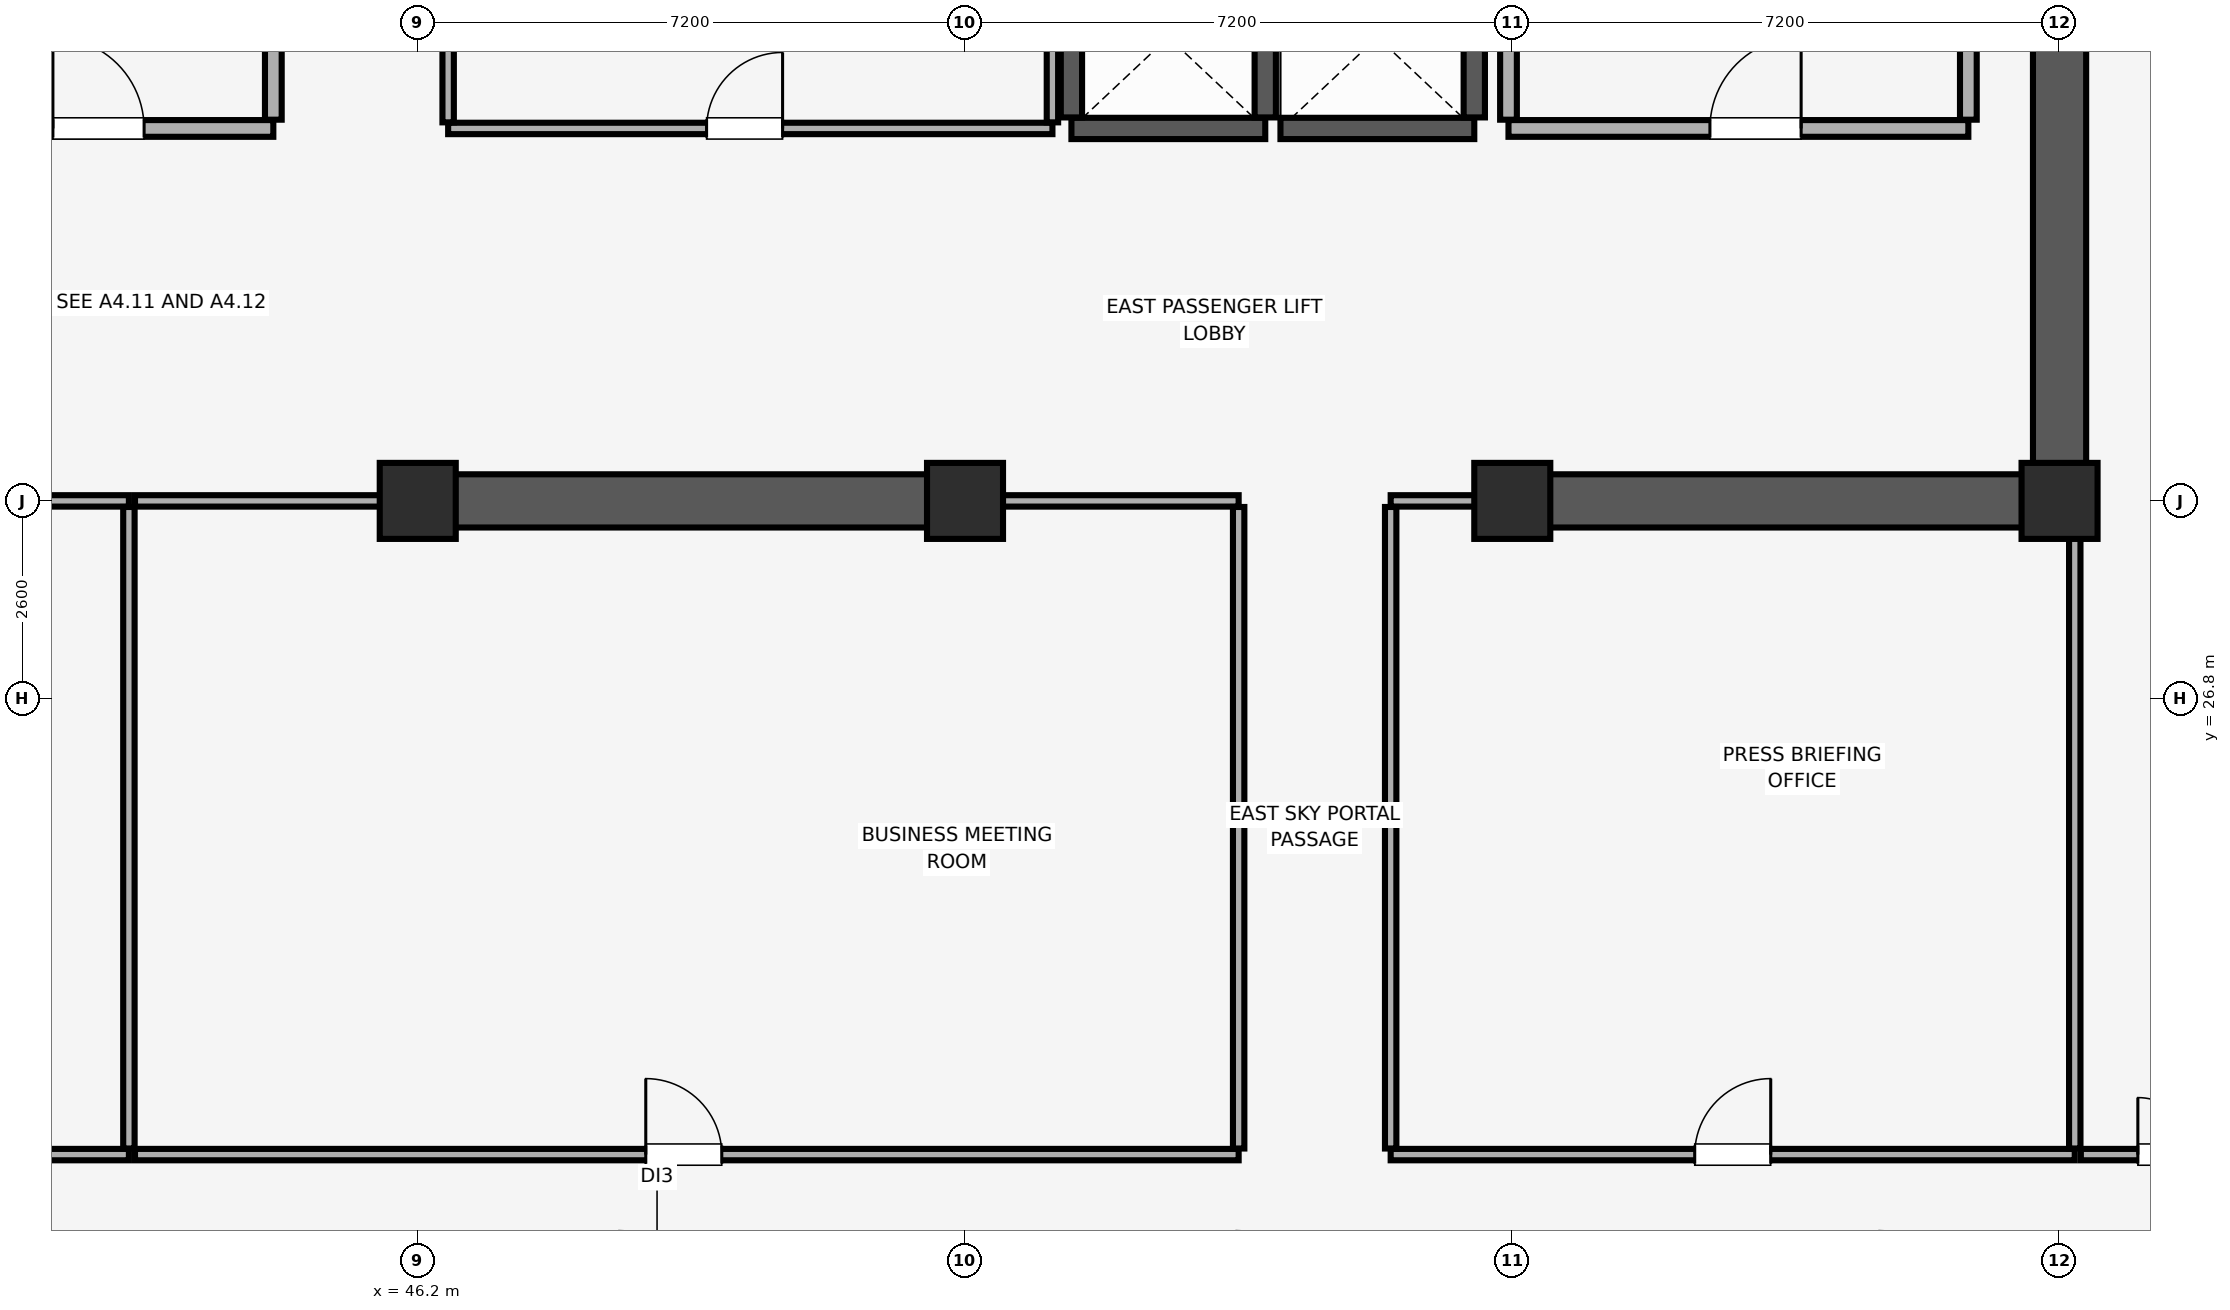
"""IFC4 building model, lengths in metres.
Left out: names, types, materials, properties, quantities, classifications, styles, units other than length and angle.
Written with IfcOpenShell. Run it as: python <this file> out.ifc"""

import sys

from ifc_helpers import new_model, si_unit, direction, frame, frame_2d, origin, origin_2d, place, context, subcontext, project, spatial, rectangle, extrude, element, fill, save


model = new_model("IFC4")
c1 = context("Model", 3, precision=1e-05, world=origin(), true_north=direction((0.0, 1.0)))
c2 = subcontext(c1, "Body", "Model", "MODEL_VIEW")
j1 = project(units=[si_unit("LENGTHUNIT", "METRE"), si_unit("PLANEANGLEUNIT", "RADIAN")], contexts=[c1])
p1 = place(None, origin())
s1 = spatial("IfcSite", under=j1, at=p1, CompositionType="ELEMENT")
p2 = place(p1, origin())
s2 = spatial("IfcBuilding", under=s1, at=p2, CompositionType="ELEMENT")
p3 = place(p2, frame((0.0, 0.0, 285.9)))
s3 = spatial("IfcBuildingStorey", under=s2, at=p3, CompositionType="ELEMENT", Elevation=285.9)
for number, where, z_axis, x_axis in (
    (1, (46.2, 29.4, 0.0), (0.0, 0.0, 1.0), (1.0, 0.0, 0.0)),
    (2, (53.4, 29.4, 0.0), (0.0, 0.0, 1.0), (1.0, 0.0, 0.0)),
    (3, (60.6, 29.4, 0.0), (0.0, 0.0, 1.0), (1.0, 0.0, 0.0)),
    (4, (67.8, 29.4, 0.0), (0.0, 0.0, 1.0), (1.0, 0.0, 0.0)),
):
    element("IfcColumn", number, at=place(p3, frame(where, z_axis=z_axis, x_axis=x_axis)), inside=s3, PredefinedType="COLUMN", context=c2, shape_type="SweptSolid", body=[
        extrude(rectangle(XDim=1.0, YDim=1.0, at=origin_2d()), origin(), (0.0, 0.0, 1.0), 4.1),
    ])
p4 = place(p3, frame((67.8, 29.4, 0.0), z_axis=(0.0, 0.0, 1.0), x_axis=(0.0, 1.0, 0.0)))
e5 = element("IfcWall", 5, at=p4, inside=s3, PredefinedType="SHEAR", context=c2, shape_type="SweptSolid", body=[
    extrude(rectangle(XDim=19.2, YDim=0.7, at=frame_2d((9.6, 0.0))), origin(), (0.0, 0.0, 1.0), 4.1),
])
p5 = place(p3, frame((46.0, 29.4, 0.0), z_axis=(0.0, 0.0, 1.0), x_axis=(1.0, 0.0, 0.0)))
e6 = element("IfcWall", 6, at=p5, inside=s3, PredefinedType="SHEAR", context=c2, shape_type="SweptSolid", body=[
    extrude(rectangle(XDim=7.6, YDim=0.7, at=frame_2d((3.8, 0.0))), origin(), (0.0, 0.0, 1.0), 4.1),
])
p6 = place(p3, frame((60.4, 29.4, 0.0), z_axis=(0.0, 0.0, 1.0), x_axis=(1.0, 0.0, 0.0)))
e7 = element("IfcWall", 7, at=p6, inside=s3, PredefinedType="SHEAR", context=c2, shape_type="SweptSolid", body=[
    extrude(rectangle(XDim=7.045, YDim=0.7, at=frame_2d((3.522, 0.0))), origin(), (0.0, 0.0, 1.0), 4.1),
])
p7 = place(p3, frame((54.8, 34.3, 0.0), z_axis=(0.0, 0.0, 1.0), x_axis=(1.0, 0.0, 0.0)))
e8 = element("IfcWall", 8, at=p7, inside=s3, PredefinedType="SHEAR", context=c2, shape_type="SweptSolid", body=[
    extrude(rectangle(XDim=2.55, YDim=0.28, at=frame_2d((1.275, 0.0))), origin(), (0.0, 0.0, 1.0), 4.1),
])
for number, where, z_axis, x_axis in (
    (9, (54.8, 34.445, 0.0), (0.0, 0.0, 1.0), (0.0, 1.0, 0.0)),
    (10, (57.35, 34.445, 0.0), (0.0, 0.0, 1.0), (0.0, 1.0, 0.0)),
):
    element("IfcWall", number, at=place(p3, frame(where, z_axis=z_axis, x_axis=x_axis)), inside=s3, PredefinedType="SHEAR", context=c2, shape_type="SweptSolid", body=[
        extrude(rectangle(XDim=2.11, YDim=0.28, at=frame_2d((1.055, 0.0))), origin(), (0.0, 0.0, 1.0), 4.1),
    ])
p8 = place(p3, frame((57.55, 34.3, 0.0), z_axis=(0.0, 0.0, 1.0), x_axis=(1.0, 0.0, 0.0)))
e11 = element("IfcWall", 11, at=p8, inside=s3, PredefinedType="SHEAR", context=c2, shape_type="SweptSolid", body=[
    extrude(rectangle(XDim=2.55, YDim=0.28, at=frame_2d((1.275, 0.0))), origin(), (0.0, 0.0, 1.0), 4.1),
])
p9 = place(p3, frame((60.1, 34.445, 0.0), z_axis=(0.0, 0.0, 1.0), x_axis=(0.0, 1.0, 0.0)))
e12 = element("IfcWall", 12, at=p9, inside=s3, PredefinedType="SHEAR", context=c2, shape_type="SweptSolid", body=[
    extrude(rectangle(XDim=2.11, YDim=0.28, at=frame_2d((1.055, 0.0))), origin(), (0.0, 0.0, 1.0), 4.1),
])
p10 = place(p3, frame((60.55, 34.3, 0.0), z_axis=(0.0, 0.0, 1.0), x_axis=(1.0, 0.0, 0.0)))
e13 = element("IfcWall", 13, at=p10, inside=s3, PredefinedType="PARTITIONING", context=c2, shape_type="SweptSolid", body=[
    extrude(rectangle(XDim=6.05, YDim=0.22, at=frame_2d((3.025, 0.0))), origin(), (0.0, 0.0, 1.0), 4.1),
])
p11 = place(p10, frame((2.65, 0.0, 0.0)))
e14 = element("IfcOpeningElement", 14, at=p11, cuts=e13, PredefinedType="OPENING", context=c2, shape_type="SweptSolid", body=[
    extrude(rectangle(XDim=1.2, YDim=2.15, at=frame_2d((0.6, 1.075))), frame((0.0, 0.12, 0.0), z_axis=(0.0, -1.0, 0.0), x_axis=(1.0, 0.0, 0.0)), (0.0, 0.0, 1.0), 0.24),
])
p12 = place(p3, frame((60.55, 34.415, 0.0), z_axis=(0.0, 0.0, 1.0), x_axis=(0.0, 1.0, 0.0)))
e15 = element("IfcWall", 15, at=p12, inside=s3, PredefinedType="PARTITIONING", context=c2, shape_type="SweptSolid", body=[
    extrude(rectangle(XDim=5.64, YDim=0.22, at=frame_2d((2.82, 0.0))), origin(), (0.0, 0.0, 1.0), 4.1),
])
p13 = place(p3, frame((66.6, 34.415, 0.0), z_axis=(0.0, 0.0, 1.0), x_axis=(0.0, 1.0, 0.0)))
e16 = element("IfcWall", 16, at=p13, inside=s3, PredefinedType="PARTITIONING", context=c2, shape_type="SweptSolid", body=[
    extrude(rectangle(XDim=5.43, YDim=0.22, at=frame_2d((2.715, 0.0))), origin(), (0.0, 0.0, 1.0), 4.1),
])
p14 = place(p3, frame((39.7, 34.3, 0.0), z_axis=(0.0, 0.0, 1.0), x_axis=(1.0, 0.0, 0.0)))
e17 = element("IfcWall", 17, at=p14, inside=s3, PredefinedType="PARTITIONING", context=c2, shape_type="SweptSolid", body=[
    extrude(rectangle(XDim=4.6, YDim=0.22, at=frame_2d((2.3, 0.0))), origin(), (0.0, 0.0, 1.0), 4.1),
])
p15 = place(p14, frame((1.7, 0.0, 0.0)))
e18 = element("IfcOpeningElement", 18, at=p15, cuts=e17, PredefinedType="OPENING", context=c2, shape_type="SweptSolid", body=[
    extrude(rectangle(XDim=1.2, YDim=2.15, at=frame_2d((0.6, 1.075))), frame((0.0, 0.12, 0.0), z_axis=(0.0, -1.0, 0.0), x_axis=(1.0, 0.0, 0.0)), (0.0, 0.0, 1.0), 0.24),
])
p16 = place(p3, frame((44.3, 34.415, 0.0), z_axis=(0.0, 0.0, 1.0), x_axis=(0.0, 1.0, 0.0)))
e19 = element("IfcWall", 19, at=p16, inside=s3, PredefinedType="PARTITIONING", context=c2, shape_type="SweptSolid", body=[
    extrude(rectangle(XDim=5.785, YDim=0.22, at=frame_2d((2.893, 0.0))), origin(), (0.0, 0.0, 1.0), 4.1),
])
p17 = place(p3, frame((46.6, 34.3, 0.0), z_axis=(0.0, 0.0, 1.0), x_axis=(1.0, 0.0, 0.0)))
e20 = element("IfcWall", 20, at=p17, inside=s3, PredefinedType="PARTITIONING", context=c2, shape_type="SweptSolid", body=[
    extrude(rectangle(XDim=7.95, YDim=0.15, at=frame_2d((3.975, 0.0))), origin(), (0.0, 0.0, 1.0), 4.1),
])
p18 = place(p17, frame((3.4, 0.0, 0.0)))
e21 = element("IfcOpeningElement", 21, at=p18, cuts=e20, PredefinedType="OPENING", context=c2, shape_type="SweptSolid", body=[
    extrude(rectangle(XDim=1.0, YDim=2.15, at=frame_2d((0.5, 1.075))), frame((0.0, 0.085, 0.0), z_axis=(0.0, -1.0, 0.0), x_axis=(1.0, 0.0, 0.0)), (0.0, 0.0, 1.0), 0.17),
])
for number, where, z_axis, x_axis in (
    (22, (46.6, 34.38, 0.0), (0.0, 0.0, 1.0), (0.0, 1.0, 0.0)),
    (23, (54.55, 34.38, 0.0), (0.0, 0.0, 1.0), (0.0, 1.0, 0.0)),
):
    element("IfcWall", number, at=place(p3, frame(where, z_axis=z_axis, x_axis=x_axis)), inside=s3, PredefinedType="PARTITIONING", context=c2, shape_type="SweptSolid", body=[
        extrude(rectangle(XDim=4.94, YDim=0.15, at=frame_2d((2.47, 0.0))), origin(), (0.0, 0.0, 1.0), 4.1),
    ])
p19 = place(p3, frame((27.0, 20.8, 0.0), z_axis=(0.0, 0.0, 1.0), x_axis=(1.0, 0.0, 0.0)))
e24 = element("IfcWall", 24, at=p19, inside=s3, PredefinedType="PARTITIONING", context=c2, shape_type="SweptSolid", body=[
    extrude(rectangle(XDim=15.4, YDim=0.15, at=frame_2d((7.7, 0.0))), origin(), (0.0, 0.0, 1.0), 4.1),
])
p20 = place(p19, frame((7.2, 0.0, 0.0)))
e25 = element("IfcOpeningElement", 25, at=p20, cuts=e24, PredefinedType="OPENING", context=c2, shape_type="SweptSolid", body=[
    extrude(rectangle(XDim=1.0, YDim=2.15, at=frame_2d((0.5, 1.075))), frame((0.0, 0.085, 0.0), z_axis=(0.0, -1.0, 0.0), x_axis=(1.0, 0.0, 0.0)), (0.0, 0.0, 1.0), 0.17),
])
p21 = place(p3, frame((38.01, 29.4, 0.0), z_axis=(0.0, 0.0, 1.0), x_axis=(1.0, 0.0, 0.0)))
e26 = element("IfcWall", 26, at=p21, inside=s3, PredefinedType="PARTITIONING", context=c2, shape_type="SweptSolid", body=[
    extrude(rectangle(XDim=4.39, YDim=0.15, at=frame_2d((2.195, 0.0))), origin(), (0.0, 0.0, 1.0), 3.0),
])
p22 = place(p3, frame((42.4, 20.88, 0.0), z_axis=(0.0, 0.0, 1.0), x_axis=(0.0, 1.0, 0.0)))
e27 = element("IfcWall", 27, at=p22, inside=s3, PredefinedType="PARTITIONING", context=c2, shape_type="SweptSolid", body=[
    extrude(rectangle(XDim=8.44, YDim=0.15, at=frame_2d((4.22, 0.0))), origin(), (0.0, 0.0, 1.0), 4.1),
])
p23 = place(p3, frame((42.48, 20.8, 0.0), z_axis=(0.0, 0.0, 1.0), x_axis=(1.0, 0.0, 0.0)))
e28 = element("IfcWall", 28, at=p23, inside=s3, PredefinedType="PARTITIONING", context=c2, shape_type="SweptSolid", body=[
    extrude(rectangle(XDim=14.52, YDim=0.15, at=frame_2d((7.26, 0.0))), origin(), (0.0, 0.0, 1.0), 4.1),
])
p24 = place(p23, frame((6.72, 0.0, 0.0)))
e29 = element("IfcOpeningElement", 29, at=p24, cuts=e28, PredefinedType="OPENING", context=c2, shape_type="SweptSolid", body=[
    extrude(rectangle(XDim=1.0, YDim=2.15, at=frame_2d((0.5, 1.075))), frame((0.0, 0.085, 0.0), z_axis=(0.0, -1.0, 0.0), x_axis=(1.0, 0.0, 0.0)), (0.0, 0.0, 1.0), 0.17),
])
p25 = place(p3, frame((42.48, 29.4, 0.0), z_axis=(0.0, 0.0, 1.0), x_axis=(1.0, 0.0, 0.0)))
e30 = element("IfcWall", 30, at=p25, inside=s3, PredefinedType="PARTITIONING", context=c2, shape_type="SweptSolid", body=[
    extrude(rectangle(XDim=3.51, YDim=0.15, at=frame_2d((1.755, 0.0))), origin(), (0.0, 0.0, 1.0), 3.0),
])
p26 = place(p3, frame((53.61, 29.4, 0.0), z_axis=(0.0, 0.0, 1.0), x_axis=(1.0, 0.0, 0.0)))
e31 = element("IfcWall", 31, at=p26, inside=s3, PredefinedType="PARTITIONING", context=c2, shape_type="SweptSolid", body=[
    extrude(rectangle(XDim=3.39, YDim=0.15, at=frame_2d((1.695, 0.0))), origin(), (0.0, 0.0, 1.0), 3.0),
])
p27 = place(p3, frame((57.0, 20.88, 0.0), z_axis=(0.0, 0.0, 1.0), x_axis=(0.0, 1.0, 0.0)))
e32 = element("IfcWall", 32, at=p27, inside=s3, PredefinedType="PARTITIONING", context=c2, shape_type="SweptSolid", body=[
    extrude(rectangle(XDim=8.44, YDim=0.15, at=frame_2d((4.22, 0.0))), origin(), (0.0, 0.0, 1.0), 3.74),
])
p28 = place(p3, frame((59.0, 20.8, 0.0), z_axis=(0.0, 0.0, 1.0), x_axis=(1.0, 0.0, 0.0)))
e33 = element("IfcWall", 33, at=p28, inside=s3, PredefinedType="PARTITIONING", context=c2, shape_type="SweptSolid", body=[
    extrude(rectangle(XDim=9.0, YDim=0.15, at=frame_2d((4.5, 0.0))), origin(), (0.0, 0.0, 1.0), 4.1),
])
p29 = place(p28, frame((4.0, 0.0, 0.0)))
e34 = element("IfcOpeningElement", 34, at=p29, cuts=e33, PredefinedType="OPENING", context=c2, shape_type="SweptSolid", body=[
    extrude(rectangle(XDim=1.0, YDim=2.15, at=frame_2d((0.5, 1.075))), frame((0.0, 0.085, 0.0), z_axis=(0.0, -1.0, 0.0), x_axis=(1.0, 0.0, 0.0)), (0.0, 0.0, 1.0), 0.17),
])
p30 = place(p3, frame((59.0, 29.4, 0.0), z_axis=(0.0, 0.0, 1.0), x_axis=(1.0, 0.0, 0.0)))
e35 = element("IfcWall", 35, at=p30, inside=s3, PredefinedType="PARTITIONING", context=c2, shape_type="SweptSolid", body=[
    extrude(rectangle(XDim=1.39, YDim=0.15, at=frame_2d((0.695, 0.0))), origin(), (0.0, 0.0, 1.0), 3.0),
])
p31 = place(p3, frame((59.0, 20.88, 0.0), z_axis=(0.0, 0.0, 1.0), x_axis=(0.0, 1.0, 0.0)))
e36 = element("IfcWall", 36, at=p31, inside=s3, PredefinedType="PARTITIONING", context=c2, shape_type="SweptSolid", body=[
    extrude(rectangle(XDim=8.44, YDim=0.15, at=frame_2d((4.22, 0.0))), origin(), (0.0, 0.0, 1.0), 4.1),
])
p32 = place(p3, frame((68.0, 20.88, 0.0), z_axis=(0.0, 0.0, 1.0), x_axis=(0.0, 1.0, 0.0)))
e37 = element("IfcWall", 37, at=p32, inside=s3, PredefinedType="PARTITIONING", context=c2, shape_type="SweptSolid", body=[
    extrude(rectangle(XDim=8.51, YDim=0.15, at=frame_2d((4.255, 0.0))), origin(), (0.0, 0.0, 1.0), 3.74),
])
p33 = place(p3, frame((68.08, 20.8, 0.0), z_axis=(0.0, 0.0, 1.0), x_axis=(1.0, 0.0, 0.0)))
e38 = element("IfcWall", 38, at=p33, inside=s3, PredefinedType="PARTITIONING", context=c2, shape_type="SweptSolid", body=[
    extrude(rectangle(XDim=6.77, YDim=0.15, at=frame_2d((3.385, 0.0))), origin(), (0.0, 0.0, 1.0), 4.1),
])
p34 = place(p33, frame((0.75, 0.0, 0.0)))
e39 = element("IfcOpeningElement", 39, at=p34, cuts=e38, PredefinedType="OPENING", context=c2, shape_type="SweptSolid", body=[
    extrude(rectangle(XDim=1.5, YDim=2.25, at=frame_2d((0.75, 1.125))), frame((0.0, 0.085, 0.0), z_axis=(0.0, -1.0, 0.0), x_axis=(1.0, 0.0, 0.0)), (0.0, 0.0, 1.0), 0.17),
])
p35 = place(p11, origin())
e40 = element("IfcDoor", 40, at=p35, inside=s3, OperationType="SINGLE_SWING_RIGHT", PredefinedType="DOOR", context=c2, shape_type="SweptSolid", body=[
    extrude(rectangle(XDim=1.2, YDim=2.15, at=frame_2d((0.6, 1.075))), frame((0.0, 0.025, 0.0), z_axis=(0.0, -1.0, 0.0), x_axis=(1.0, 0.0, 0.0)), (0.0, 0.0, 1.0), 0.05),
])
fill(e14, e40)
p36 = place(p15, origin())
e41 = element("IfcDoor", 41, at=p36, inside=s3, OperationType="SINGLE_SWING_LEFT", PredefinedType="DOOR", context=c2, shape_type="SweptSolid", body=[
    extrude(rectangle(XDim=1.2, YDim=2.15, at=frame_2d((0.6, 1.075))), frame((0.0, 0.025, 0.0), z_axis=(0.0, -1.0, 0.0), x_axis=(1.0, 0.0, 0.0)), (0.0, 0.0, 1.0), 0.05),
])
fill(e18, e41)
p37 = place(p18, origin())
e42 = element("IfcDoor", 42, at=p37, inside=s3, OperationType="SINGLE_SWING_RIGHT", PredefinedType="DOOR", context=c2, shape_type="SweptSolid", body=[
    extrude(rectangle(XDim=1.0, YDim=2.15, at=frame_2d((0.5, 1.075))), frame((0.0, 0.025, 0.0), z_axis=(0.0, -1.0, 0.0), x_axis=(1.0, 0.0, 0.0)), (0.0, 0.0, 1.0), 0.05),
])
fill(e21, e42)
p38 = place(p24, origin())
e43 = element("IfcDoor", 43, at=p38, inside=s3, OperationType="SINGLE_SWING_LEFT", PredefinedType="DOOR", context=c2, shape_type="SweptSolid", body=[
    extrude(rectangle(XDim=1.0, YDim=2.15, at=frame_2d((0.5, 1.075))), frame((0.0, 0.025, 0.0), z_axis=(0.0, -1.0, 0.0), x_axis=(1.0, 0.0, 0.0)), (0.0, 0.0, 1.0), 0.05),
])
fill(e29, e43)
p39 = place(p29, origin())
e44 = element("IfcDoor", 44, at=p39, inside=s3, OperationType="SINGLE_SWING_RIGHT", PredefinedType="DOOR", context=c2, shape_type="SweptSolid", body=[
    extrude(rectangle(XDim=1.0, YDim=2.15, at=frame_2d((0.5, 1.075))), frame((0.0, 0.025, 0.0), z_axis=(0.0, -1.0, 0.0), x_axis=(1.0, 0.0, 0.0)), (0.0, 0.0, 1.0), 0.05),
])
fill(e34, e44)
p40 = place(p34, origin())
e45 = element("IfcDoor", 45, at=p40, inside=s3, OperationType="DOUBLE_DOOR_SINGLE_SWING", PredefinedType="DOOR", context=c2, shape_type="SweptSolid", body=[
    extrude(rectangle(XDim=1.5, YDim=2.25, at=frame_2d((0.75, 1.125))), frame((0.0, 0.025, 0.0), z_axis=(0.0, -1.0, 0.0), x_axis=(1.0, 0.0, 0.0)), (0.0, 0.0, 1.0), 0.05),
])
fill(e39, e45)
save(model, sys.argv[1])
